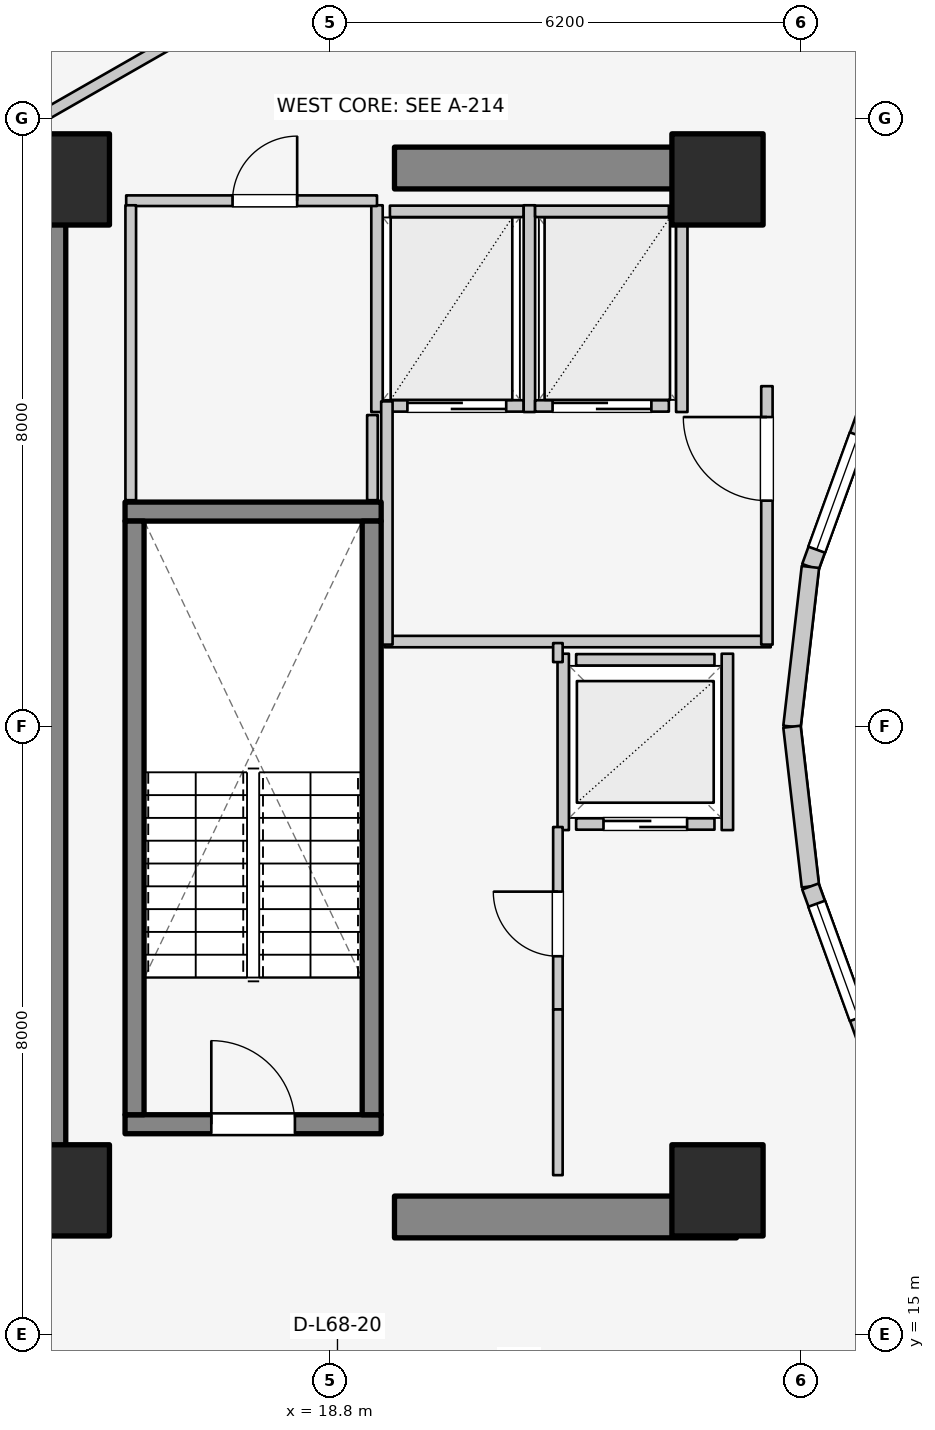
"""IFC4 building model, lengths in metres.
Left out: names, types, materials, properties, quantities, classifications, styles, units other than length and angle.
Written with IfcOpenShell. Run it as: python <this file> out.ifc"""

import sys

from ifc_helpers import new_model, si_unit, direction, frame, frame_2d, origin, origin_2d, place, context, subcontext, project, spatial, rectangle, extrude, element, fill, save


model = new_model("IFC4")
c1 = context("Model", 3, precision=1e-05, world=origin(), true_north=direction((0.0, 1.0)))
c2 = subcontext(c1, "Body", "Model", "MODEL_VIEW")
j1 = project(units=[si_unit("LENGTHUNIT", "METRE"), si_unit("PLANEANGLEUNIT", "RADIAN")], contexts=[c1])
p1 = place(None, origin())
s1 = spatial("IfcSite", under=j1, at=p1, CompositionType="ELEMENT")
p2 = place(p1, origin())
s2 = spatial("IfcBuilding", under=s1, at=p2, CompositionType="ELEMENT")
p3 = place(p2, frame((0.0, 0.0, 223.3)))
s3 = spatial("IfcBuildingStorey", under=s2, at=p3, CompositionType="ELEMENT", Elevation=223.3)
p4 = place(p3, frame((15.05, 17.05, 0.0), z_axis=(0.0, 0.0, 1.0), x_axis=(0.0, 1.0, 0.0)))
e1 = element("IfcWall", 1, at=p4, inside=s3, PredefinedType="SHEAR", context=c2, shape_type="SweptSolid", body=[
    extrude(rectangle(XDim=12.8, YDim=0.55, at=frame_2d((6.4, 0.0))), origin(), (0.0, 0.0, 1.0), 3.1),
])
for number, where, z_axis, x_axis in (
    (2, (19.65, 16.55, 0.0), (0.0, 0.0, 1.0), (1.0, 0.0, 0.0)),
    (3, (19.65, 30.35, 0.0), (0.0, 0.0, 1.0), (1.0, 0.0, 0.0)),
):
    element("IfcWall", number, at=place(p3, frame(where, z_axis=z_axis, x_axis=x_axis)), inside=s3, PredefinedType="SHEAR", context=c2, shape_type="SweptSolid", body=[
        extrude(rectangle(XDim=4.5, YDim=0.55, at=frame_2d((2.25, 0.0))), origin(), (0.0, 0.0, 1.0), 3.1),
    ])
p5 = place(p3, frame((16.105, 17.77, 0.0), z_axis=(0.0, 0.0, 1.0), x_axis=(1.0, 0.0, 0.0)))
e4 = element("IfcWall", 4, at=p5, inside=s3, PredefinedType="SOLIDWALL", context=c2, shape_type="SweptSolid", body=[
    extrude(rectangle(XDim=3.37, YDim=0.25, at=frame_2d((1.685, 0.0))), origin(), (0.0, 0.0, 1.0), 3.1),
])
p6 = place(p5, frame((1.135, 0.0, 0.0)))
e5 = element("IfcOpeningElement", 5, at=p6, cuts=e4, PredefinedType="OPENING", context=c2, shape_type="SweptSolid", body=[
    extrude(rectangle(XDim=1.1, YDim=2.1, at=frame_2d((0.55, 1.05))), frame((0.0, 0.135, 0.0), z_axis=(0.0, -1.0, 0.0), x_axis=(1.0, 0.0, 0.0)), (0.0, 0.0, 1.0), 0.27),
])
p7 = place(p3, frame((16.105, 25.83, 0.0), z_axis=(0.0, 0.0, 1.0), x_axis=(1.0, 0.0, 0.0)))
e6 = element("IfcWall", 6, at=p7, inside=s3, PredefinedType="SOLIDWALL", context=c2, shape_type="SweptSolid", body=[
    extrude(rectangle(XDim=3.37, YDim=0.25, at=frame_2d((1.685, 0.0))), origin(), (0.0, 0.0, 1.0), 3.1),
])
for number, where, z_axis, x_axis in (
    (7, (16.23, 17.895, 0.0), (0.0, 0.0, 1.0), (0.0, 1.0, 0.0)),
    (8, (19.35, 17.895, 0.0), (0.0, 0.0, 1.0), (0.0, 1.0, 0.0)),
):
    element("IfcWall", number, at=place(p3, frame(where, z_axis=z_axis, x_axis=x_axis)), inside=s3, PredefinedType="SOLIDWALL", context=c2, shape_type="SweptSolid", body=[
        extrude(rectangle(XDim=7.81, YDim=0.25, at=frame_2d((3.905, 0.0))), origin(), (0.0, 0.0, 1.0), 3.1),
    ])
for number, where, z_axis, x_axis in (
    (9, (15.3, 16.9, 0.0), (0.0, 0.0, 1.0), (1.0, 0.0, 0.0)),
    (10, (23.9, 16.9, 0.0), (0.0, 0.0, 1.0), (1.0, 0.0, 0.0)),
    (11, (23.9, 30.2, 0.0), (0.0, 0.0, 1.0), (1.0, 0.0, 0.0)),
    (12, (15.3, 30.2, 0.0), (0.0, 0.0, 1.0), (1.0, 0.0, 0.0)),
):
    element("IfcColumn", number, at=place(p3, frame(where, z_axis=z_axis, x_axis=x_axis)), inside=s3, PredefinedType="COLUMN", context=c2, shape_type="SweptSolid", body=[
        extrude(rectangle(XDim=1.2, YDim=1.2, at=origin_2d()), origin(), (0.0, 0.0, 1.0), 3.1),
    ])
p8 = place(p3, frame((25.834, 27.06, 0.0), z_axis=(0.0, 0.0, 1.0), x_axis=(-0.341423187295, -0.93990968033, 0.0)))
e13 = element("IfcWall", 13, at=p8, inside=s3, PredefinedType="STANDARD", context=c2, shape_type="SweptSolid", body=[
    extrude(rectangle(XDim=2.084, YDim=0.23, at=frame_2d((1.042, 0.0))), origin(), (0.0, 0.0, 1.0), 2.84),
])
p9 = place(p8, frame((0.242, 0.0, 0.85)))
e14 = element("IfcOpeningElement", 14, at=p9, cuts=e13, PredefinedType="OPENING", context=c2, shape_type="SweptSolid", body=[
    extrude(rectangle(XDim=1.6, YDim=1.65, at=frame_2d((0.8, 0.825))), frame((0.0, 0.125, 0.0), z_axis=(0.0, -1.0, 0.0), x_axis=(1.0, 0.0, 0.0)), (0.0, 0.0, 1.0), 0.25),
])
for number, where, z_axis, x_axis in (
    (15, (25.123, 25.102, 0.0), (0.0, 0.0, 1.0), (-0.115, -0.993, 0.0)),
    (16, (24.88, 23.0, 0.0), (0.0, 0.0, 1.0), (0.115, -0.993, 0.0)),
):
    element("IfcWall", number, at=place(p3, frame(where, z_axis=z_axis, x_axis=x_axis)), inside=s3, PredefinedType="STANDARD", context=c2, shape_type="SweptSolid", body=[
        extrude(rectangle(XDim=2.115, YDim=0.23, at=frame_2d((1.058, 0.0))), origin(), (0.0, 0.0, 1.0), 2.84),
    ])
p10 = place(p3, frame((25.123, 20.898, 0.0), z_axis=(0.0, 0.0, 1.0), x_axis=(0.341423187295, -0.93990968033, 0.0)))
e17 = element("IfcWall", 17, at=p10, inside=s3, PredefinedType="STANDARD", context=c2, shape_type="SweptSolid", body=[
    extrude(rectangle(XDim=2.084, YDim=0.23, at=frame_2d((1.042, 0.0))), origin(), (0.0, 0.0, 1.0), 2.84),
])
p11 = place(p10, frame((0.242, 0.0, 0.85)))
e18 = element("IfcOpeningElement", 18, at=p11, cuts=e17, PredefinedType="OPENING", context=c2, shape_type="SweptSolid", body=[
    extrude(rectangle(XDim=1.6, YDim=1.65, at=frame_2d((0.8, 0.825))), frame((0.0, 0.125, 0.0), z_axis=(0.0, -1.0, 0.0), x_axis=(1.0, 0.0, 0.0)), (0.0, 0.0, 1.0), 0.25),
])
p12 = place(p3, frame((16.442, 34.872, 0.0), z_axis=(0.0, 0.0, 1.0), x_axis=(-0.72731899451, -0.686299555752, 0.0)))
e19 = element("IfcWall", 19, at=p12, inside=s3, PredefinedType="STANDARD", context=c2, shape_type="SweptSolid", body=[
    extrude(rectangle(XDim=4.404, YDim=0.26, at=frame_2d((2.202, 0.0))), origin(), (0.0, 0.0, 1.0), 2.85),
])
p13 = place(p12, frame((1.452, 0.0, 0.75)))
e20 = element("IfcOpeningElement", 20, at=p13, cuts=e19, PredefinedType="OPENING", context=c2, shape_type="SweptSolid", body=[
    extrude(rectangle(XDim=1.5, YDim=1.6, at=frame_2d((0.75, 0.8))), frame((0.0, 0.14, 0.0), z_axis=(0.0, -1.0, 0.0), x_axis=(1.0, 0.0, 0.0)), (0.0, 0.0, 1.0), 0.28),
])
p14 = place(p3, frame((22.04, 21.72, 0.0), z_axis=(0.0, 0.0, 1.0), x_axis=(1.0, 0.0, 0.0)))
e21 = element("IfcWall", 21, at=p14, inside=s3, PredefinedType="SOLIDWALL", context=c2, shape_type="SweptSolid", body=[
    extrude(rectangle(XDim=1.82, YDim=0.15, at=frame_2d((0.91, 0.0))), origin(), (0.0, 0.0, 1.0), 2.12),
])
p15 = place(p14, frame((0.36, 0.0, 0.0)))
e22 = element("IfcOpeningElement", 22, at=p15, cuts=e21, PredefinedType="OPENING", context=c2, shape_type="SweptSolid", body=[
    extrude(rectangle(XDim=1.1, YDim=2.1, at=frame_2d((0.55, 1.05))), frame((0.0, 0.085, 0.0), z_axis=(0.0, -1.0, 0.0), x_axis=(1.0, 0.0, 0.0)), (0.0, 0.0, 1.0), 0.17),
])
p16 = place(p3, frame((22.04, 23.88, 0.0), z_axis=(0.0, 0.0, 1.0), x_axis=(1.0, 0.0, 0.0)))
e23 = element("IfcWall", 23, at=p16, inside=s3, PredefinedType="SOLIDWALL", context=c2, shape_type="SweptSolid", body=[
    extrude(rectangle(XDim=1.82, YDim=0.15, at=frame_2d((0.91, 0.0))), origin(), (0.0, 0.0, 1.0), 2.12),
])
p17 = place(p3, frame((21.87, 21.64, 0.0), z_axis=(0.0, 0.0, 1.0), x_axis=(0.0, 1.0, 0.0)))
e24 = element("IfcWall", 24, at=p17, inside=s3, PredefinedType="SOLIDWALL", context=c2, shape_type="SweptSolid", body=[
    extrude(rectangle(XDim=2.32, YDim=0.15, at=frame_2d((1.16, 0.0))), origin(), (0.0, 0.0, 1.0), 2.855),
])
p18 = place(p3, frame((24.03, 21.64, 0.0), z_axis=(0.0, 0.0, 1.0), x_axis=(0.0, 1.0, 0.0)))
e25 = element("IfcWall", 25, at=p18, inside=s3, PredefinedType="SOLIDWALL", context=c2, shape_type="SweptSolid", body=[
    extrude(rectangle(XDim=2.32, YDim=0.15, at=frame_2d((1.16, 0.0))), origin(), (0.0, 0.0, 1.0), 2.12),
])
p19 = place(p3, frame((19.59, 27.22, 0.0), z_axis=(0.0, 0.0, 1.0), x_axis=(1.0, 0.0, 0.0)))
e26 = element("IfcWall", 26, at=p19, inside=s3, PredefinedType="SOLIDWALL", context=c2, shape_type="SweptSolid", body=[
    extrude(rectangle(XDim=1.76, YDim=0.15, at=frame_2d((0.88, 0.0))), origin(), (0.0, 0.0, 1.0), 2.855),
])
p20 = place(p19, frame((0.23, 0.0, 0.0)))
e27 = element("IfcOpeningElement", 27, at=p20, cuts=e26, PredefinedType="OPENING", context=c2, shape_type="SweptSolid", body=[
    extrude(rectangle(XDim=1.3, YDim=2.1, at=frame_2d((0.65, 1.05))), frame((0.0, 0.085, 0.0), z_axis=(0.0, -1.0, 0.0), x_axis=(1.0, 0.0, 0.0)), (0.0, 0.0, 1.0), 0.17),
])
p21 = place(p3, frame((19.59, 29.78, 0.0), z_axis=(0.0, 0.0, 1.0), x_axis=(1.0, 0.0, 0.0)))
e28 = element("IfcWall", 28, at=p21, inside=s3, PredefinedType="SOLIDWALL", context=c2, shape_type="SweptSolid", body=[
    extrude(rectangle(XDim=1.76, YDim=0.15, at=frame_2d((0.88, 0.0))), origin(), (0.0, 0.0, 1.0), 2.855),
])
for number, where, z_axis, x_axis in (
    (29, (19.42, 27.14, 0.0), (0.0, 0.0, 1.0), (0.0, 1.0, 0.0)),
    (30, (21.425, 27.14, 0.0), (0.0, 0.0, 1.0), (0.0, 1.0, 0.0)),
):
    element("IfcWall", number, at=place(p3, frame(where, z_axis=z_axis, x_axis=x_axis)), inside=s3, PredefinedType="SOLIDWALL", context=c2, shape_type="SweptSolid", body=[
        extrude(rectangle(XDim=2.72, YDim=0.15, at=frame_2d((1.36, 0.0))), origin(), (0.0, 0.0, 1.0), 2.855),
    ])
p22 = place(p3, frame((21.5, 27.22, 0.0), z_axis=(0.0, 0.0, 1.0), x_axis=(1.0, 0.0, 0.0)))
e31 = element("IfcWall", 31, at=p22, inside=s3, PredefinedType="SOLIDWALL", context=c2, shape_type="SweptSolid", body=[
    extrude(rectangle(XDim=1.76, YDim=0.15, at=frame_2d((0.88, 0.0))), origin(), (0.0, 0.0, 1.0), 2.855),
])
p23 = place(p22, frame((0.23, 0.0, 0.0)))
e32 = element("IfcOpeningElement", 32, at=p23, cuts=e31, PredefinedType="OPENING", context=c2, shape_type="SweptSolid", body=[
    extrude(rectangle(XDim=1.3, YDim=2.1, at=frame_2d((0.65, 1.05))), frame((0.0, 0.085, 0.0), z_axis=(0.0, -1.0, 0.0), x_axis=(1.0, 0.0, 0.0)), (0.0, 0.0, 1.0), 0.17),
])
p24 = place(p3, frame((21.5, 29.78, 0.0), z_axis=(0.0, 0.0, 1.0), x_axis=(1.0, 0.0, 0.0)))
e33 = element("IfcWall", 33, at=p24, inside=s3, PredefinedType="SOLIDWALL", context=c2, shape_type="SweptSolid", body=[
    extrude(rectangle(XDim=1.76, YDim=0.15, at=frame_2d((0.88, 0.0))), origin(), (0.0, 0.0, 1.0), 2.855),
])
p25 = place(p3, frame((23.43, 27.14, 0.0), z_axis=(0.0, 0.0, 1.0), x_axis=(0.0, 1.0, 0.0)))
e34 = element("IfcWall", 34, at=p25, inside=s3, PredefinedType="SOLIDWALL", context=c2, shape_type="SweptSolid", body=[
    extrude(rectangle(XDim=2.72, YDim=0.15, at=frame_2d((1.36, 0.0))), origin(), (0.0, 0.0, 1.0), 2.855),
])
p26 = place(p3, frame((19.52, 24.12, 0.0), z_axis=(0.0, 0.0, 1.0), x_axis=(1.0, 0.0, 0.0)))
e35 = element("IfcWall", 35, at=p26, inside=s3, PredefinedType="PARTITIONING", context=c2, shape_type="SweptSolid", body=[
    extrude(rectangle(XDim=5.08, YDim=0.15, at=frame_2d((2.54, 0.0))), origin(), (0.0, 0.0, 1.0), 2.12),
])
p27 = place(p3, frame((19.55, 24.08, 0.0), z_axis=(0.0, 0.0, 1.0), x_axis=(0.0, 1.0, 0.0)))
e36 = element("IfcWall", 36, at=p27, inside=s3, PredefinedType="PARTITIONING", context=c2, shape_type="SweptSolid", body=[
    extrude(rectangle(XDim=3.2, YDim=0.15, at=frame_2d((1.6, 0.0))), origin(), (0.0, 0.0, 1.0), 2.855),
])
p28 = place(p3, frame((24.55, 24.08, 0.0), z_axis=(0.0, 0.0, 1.0), x_axis=(0.0, 1.0, 0.0)))
e37 = element("IfcWall", 37, at=p28, inside=s3, PredefinedType="PARTITIONING", context=c2, shape_type="SweptSolid", body=[
    extrude(rectangle(XDim=3.4, YDim=0.15, at=frame_2d((1.7, 0.0))), origin(), (0.0, 0.0, 1.0), 2.855),
])
p29 = place(p28, frame((1.894, 0.0, 0.0)))
e38 = element("IfcOpeningElement", 38, at=p29, cuts=e37, PredefinedType="OPENING", context=c2, shape_type="SweptSolid", body=[
    extrude(rectangle(XDim=1.1, YDim=2.1, at=frame_2d((0.55, 1.05))), frame((0.0, 0.085, 0.0), z_axis=(0.0, -1.0, 0.0), x_axis=(1.0, 0.0, 0.0)), (0.0, 0.0, 1.0), 0.17),
])
p30 = place(p3, frame((21.8, 19.28, 0.0), z_axis=(0.0, 0.0, 1.0), x_axis=(0.0, 1.0, 0.0)))
e39 = element("IfcWall", 39, at=p30, inside=s3, PredefinedType="PARTITIONING", context=c2, shape_type="SweptSolid", body=[
    extrude(rectangle(XDim=2.4, YDim=0.125, at=frame_2d((1.2, 0.0))), origin(), (0.0, 0.0, 1.0), 2.855),
])
p31 = place(p30, frame((0.7, 0.0, 0.0)))
e40 = element("IfcOpeningElement", 40, at=p31, cuts=e39, PredefinedType="OPENING", context=c2, shape_type="SweptSolid", body=[
    extrude(rectangle(XDim=0.85, YDim=2.05, at=frame_2d((0.425, 1.025))), frame((0.0, 0.073, 0.0), z_axis=(0.0, -1.0, 0.0), x_axis=(1.0, 0.0, 0.0)), (0.0, 0.0, 1.0), 0.145),
])
p32 = place(p3, frame((21.8, 23.85, 0.0), z_axis=(0.0, 0.0, 1.0), x_axis=(0.0, 1.0, 0.0)))
e41 = element("IfcWall", 41, at=p32, inside=s3, PredefinedType="PARTITIONING", context=c2, shape_type="SweptSolid", body=[
    extrude(rectangle(XDim=0.25, YDim=0.125, at=frame_2d((0.125, 0.0))), origin(), (0.0, 0.0, 1.0), 2.855),
])
p33 = place(p3, frame((21.8, 17.1, 0.0), z_axis=(0.0, 0.0, 1.0), x_axis=(0.0, 1.0, 0.0)))
e42 = element("IfcWall", 42, at=p33, inside=s3, PredefinedType="PARTITIONING", context=c2, shape_type="SweptSolid", body=[
    extrude(rectangle(XDim=2.18, YDim=0.125, at=frame_2d((1.09, 0.0))), origin(), (0.0, 0.0, 1.0), 2.855),
])
p34 = place(p3, frame((16.12, 29.92, 0.0), z_axis=(0.0, 0.0, 1.0), x_axis=(1.0, 0.0, 0.0)))
e43 = element("IfcWall", 43, at=p34, inside=s3, PredefinedType="PLUMBINGWALL", context=c2, shape_type="SweptSolid", body=[
    extrude(rectangle(XDim=3.3, YDim=0.14, at=frame_2d((1.65, 0.0))), origin(), (0.0, 0.0, 1.0), 2.855),
])
p35 = place(p34, frame((1.399, 0.0, 0.0)))
e44 = element("IfcOpeningElement", 44, at=p35, cuts=e43, PredefinedType="OPENING", context=c2, shape_type="SweptSolid", body=[
    extrude(rectangle(XDim=0.85, YDim=2.05, at=frame_2d((0.425, 1.025))), frame((0.0, 0.08, 0.0), z_axis=(0.0, -1.0, 0.0), x_axis=(1.0, 0.0, 0.0)), (0.0, 0.0, 1.0), 0.16),
])
p36 = place(p3, frame((16.18, 25.98, 0.0), z_axis=(0.0, 0.0, 1.0), x_axis=(0.0, 1.0, 0.0)))
e45 = element("IfcWall", 45, at=p36, inside=s3, PredefinedType="PLUMBINGWALL", context=c2, shape_type="SweptSolid", body=[
    extrude(rectangle(XDim=3.88, YDim=0.14, at=frame_2d((1.94, 0.0))), origin(), (0.0, 0.0, 1.0), 2.855),
])
p37 = place(p3, frame((19.36, 25.98, 0.0), z_axis=(0.0, 0.0, 1.0), x_axis=(0.0, 1.0, 0.0)))
e46 = element("IfcWall", 46, at=p37, inside=s3, PredefinedType="PLUMBINGWALL", context=c2, shape_type="SweptSolid", body=[
    extrude(rectangle(XDim=1.12, YDim=0.14, at=frame_2d((0.56, 0.0))), origin(), (0.0, 0.0, 1.0), 2.855),
])
p38 = place(p3, frame((17.243, 32.305, 0.0), z_axis=(0.0, 0.0, 1.0), x_axis=(-0.867991349648, -0.496579315857, 0.0)))
e47 = element("IfcWall", 47, at=p38, inside=s3, PredefinedType="PARTITIONING", context=c2, shape_type="SweptSolid", body=[
    extrude(rectangle(XDim=2.567, YDim=0.15, at=frame_2d((1.283, 0.0))), origin(), (0.0, 0.0, 1.0), 2.22),
])
p39 = place(p9, origin())
e48 = element("IfcWindow", 48, at=p39, inside=s3, PartitioningType="SINGLE_PANEL", PredefinedType="WINDOW", context=c2, shape_type="SweptSolid", body=[
    extrude(rectangle(XDim=1.6, YDim=1.65, at=frame_2d((0.8, 0.825))), frame((0.0, 0.03, 0.0), z_axis=(0.0, -1.0, 0.0), x_axis=(1.0, 0.0, 0.0)), (0.0, 0.0, 1.0), 0.06),
])
fill(e14, e48)
p40 = place(p11, origin())
e49 = element("IfcWindow", 49, at=p40, inside=s3, PartitioningType="SINGLE_PANEL", PredefinedType="WINDOW", context=c2, shape_type="SweptSolid", body=[
    extrude(rectangle(XDim=1.6, YDim=1.65, at=frame_2d((0.8, 0.825))), frame((0.0, 0.03, 0.0), z_axis=(0.0, -1.0, 0.0), x_axis=(1.0, 0.0, 0.0)), (0.0, 0.0, 1.0), 0.06),
])
fill(e18, e49)
p41 = place(p6, origin())
e50 = element("IfcDoor", 50, at=p41, inside=s3, OperationType="SINGLE_SWING_LEFT", PredefinedType="DOOR", context=c2, shape_type="SweptSolid", body=[
    extrude(rectangle(XDim=1.1, YDim=2.1, at=frame_2d((0.55, 1.05))), frame((0.0, 0.025, 0.0), z_axis=(0.0, -1.0, 0.0), x_axis=(1.0, 0.0, 0.0)), (0.0, 0.0, 1.0), 0.05),
])
fill(e5, e50)
p42 = place(p15, origin())
e51 = element("IfcDoor", 51, at=p42, inside=s3, OperationType="DOUBLE_DOOR_SLIDING", PredefinedType="DOOR", context=c2, shape_type="SweptSolid", body=[
    extrude(rectangle(XDim=1.1, YDim=2.1, at=frame_2d((0.55, 1.05))), frame((0.0, 0.025, 0.0), z_axis=(0.0, -1.0, 0.0), x_axis=(1.0, 0.0, 0.0)), (0.0, 0.0, 1.0), 0.05),
])
fill(e22, e51)
p43 = place(p20, origin())
e52 = element("IfcDoor", 52, at=p43, inside=s3, OperationType="DOUBLE_DOOR_SLIDING", PredefinedType="DOOR", context=c2, shape_type="SweptSolid", body=[
    extrude(rectangle(XDim=1.3, YDim=2.1, at=frame_2d((0.65, 1.05))), frame((0.0, 0.025, 0.0), z_axis=(0.0, -1.0, 0.0), x_axis=(1.0, 0.0, 0.0)), (0.0, 0.0, 1.0), 0.05),
])
fill(e27, e52)
p44 = place(p23, origin())
e53 = element("IfcDoor", 53, at=p44, inside=s3, OperationType="DOUBLE_DOOR_SLIDING", PredefinedType="DOOR", context=c2, shape_type="SweptSolid", body=[
    extrude(rectangle(XDim=1.3, YDim=2.1, at=frame_2d((0.65, 1.05))), frame((0.0, 0.025, 0.0), z_axis=(0.0, -1.0, 0.0), x_axis=(1.0, 0.0, 0.0)), (0.0, 0.0, 1.0), 0.05),
])
fill(e32, e53)
p45 = place(p29, origin())
e54 = element("IfcDoor", 54, at=p45, inside=s3, OperationType="SINGLE_SWING_RIGHT", PredefinedType="DOOR", context=c2, shape_type="SweptSolid", body=[
    extrude(rectangle(XDim=1.1, YDim=2.1, at=frame_2d((0.55, 1.05))), frame((0.0, 0.025, 0.0), z_axis=(0.0, -1.0, 0.0), x_axis=(1.0, 0.0, 0.0)), (0.0, 0.0, 1.0), 0.05),
])
fill(e38, e54)
p46 = place(p31, origin())
e55 = element("IfcDoor", 55, at=p46, inside=s3, OperationType="SINGLE_SWING_RIGHT", PredefinedType="DOOR", context=c2, shape_type="SweptSolid", body=[
    extrude(rectangle(XDim=0.85, YDim=2.05, at=frame_2d((0.425, 1.025))), frame((0.0, 0.025, 0.0), z_axis=(0.0, -1.0, 0.0), x_axis=(1.0, 0.0, 0.0)), (0.0, 0.0, 1.0), 0.05),
])
fill(e40, e55)
p47 = place(p35, origin())
e56 = element("IfcDoor", 56, at=p47, inside=s3, OperationType="SINGLE_SWING_RIGHT", PredefinedType="DOOR", context=c2, shape_type="SweptSolid", body=[
    extrude(rectangle(XDim=0.85, YDim=2.05, at=frame_2d((0.425, 1.025))), frame((0.0, 0.025, 0.0), z_axis=(0.0, -1.0, 0.0), x_axis=(1.0, 0.0, 0.0)), (0.0, 0.0, 1.0), 0.05),
])
fill(e44, e56)
save(model, sys.argv[1])
